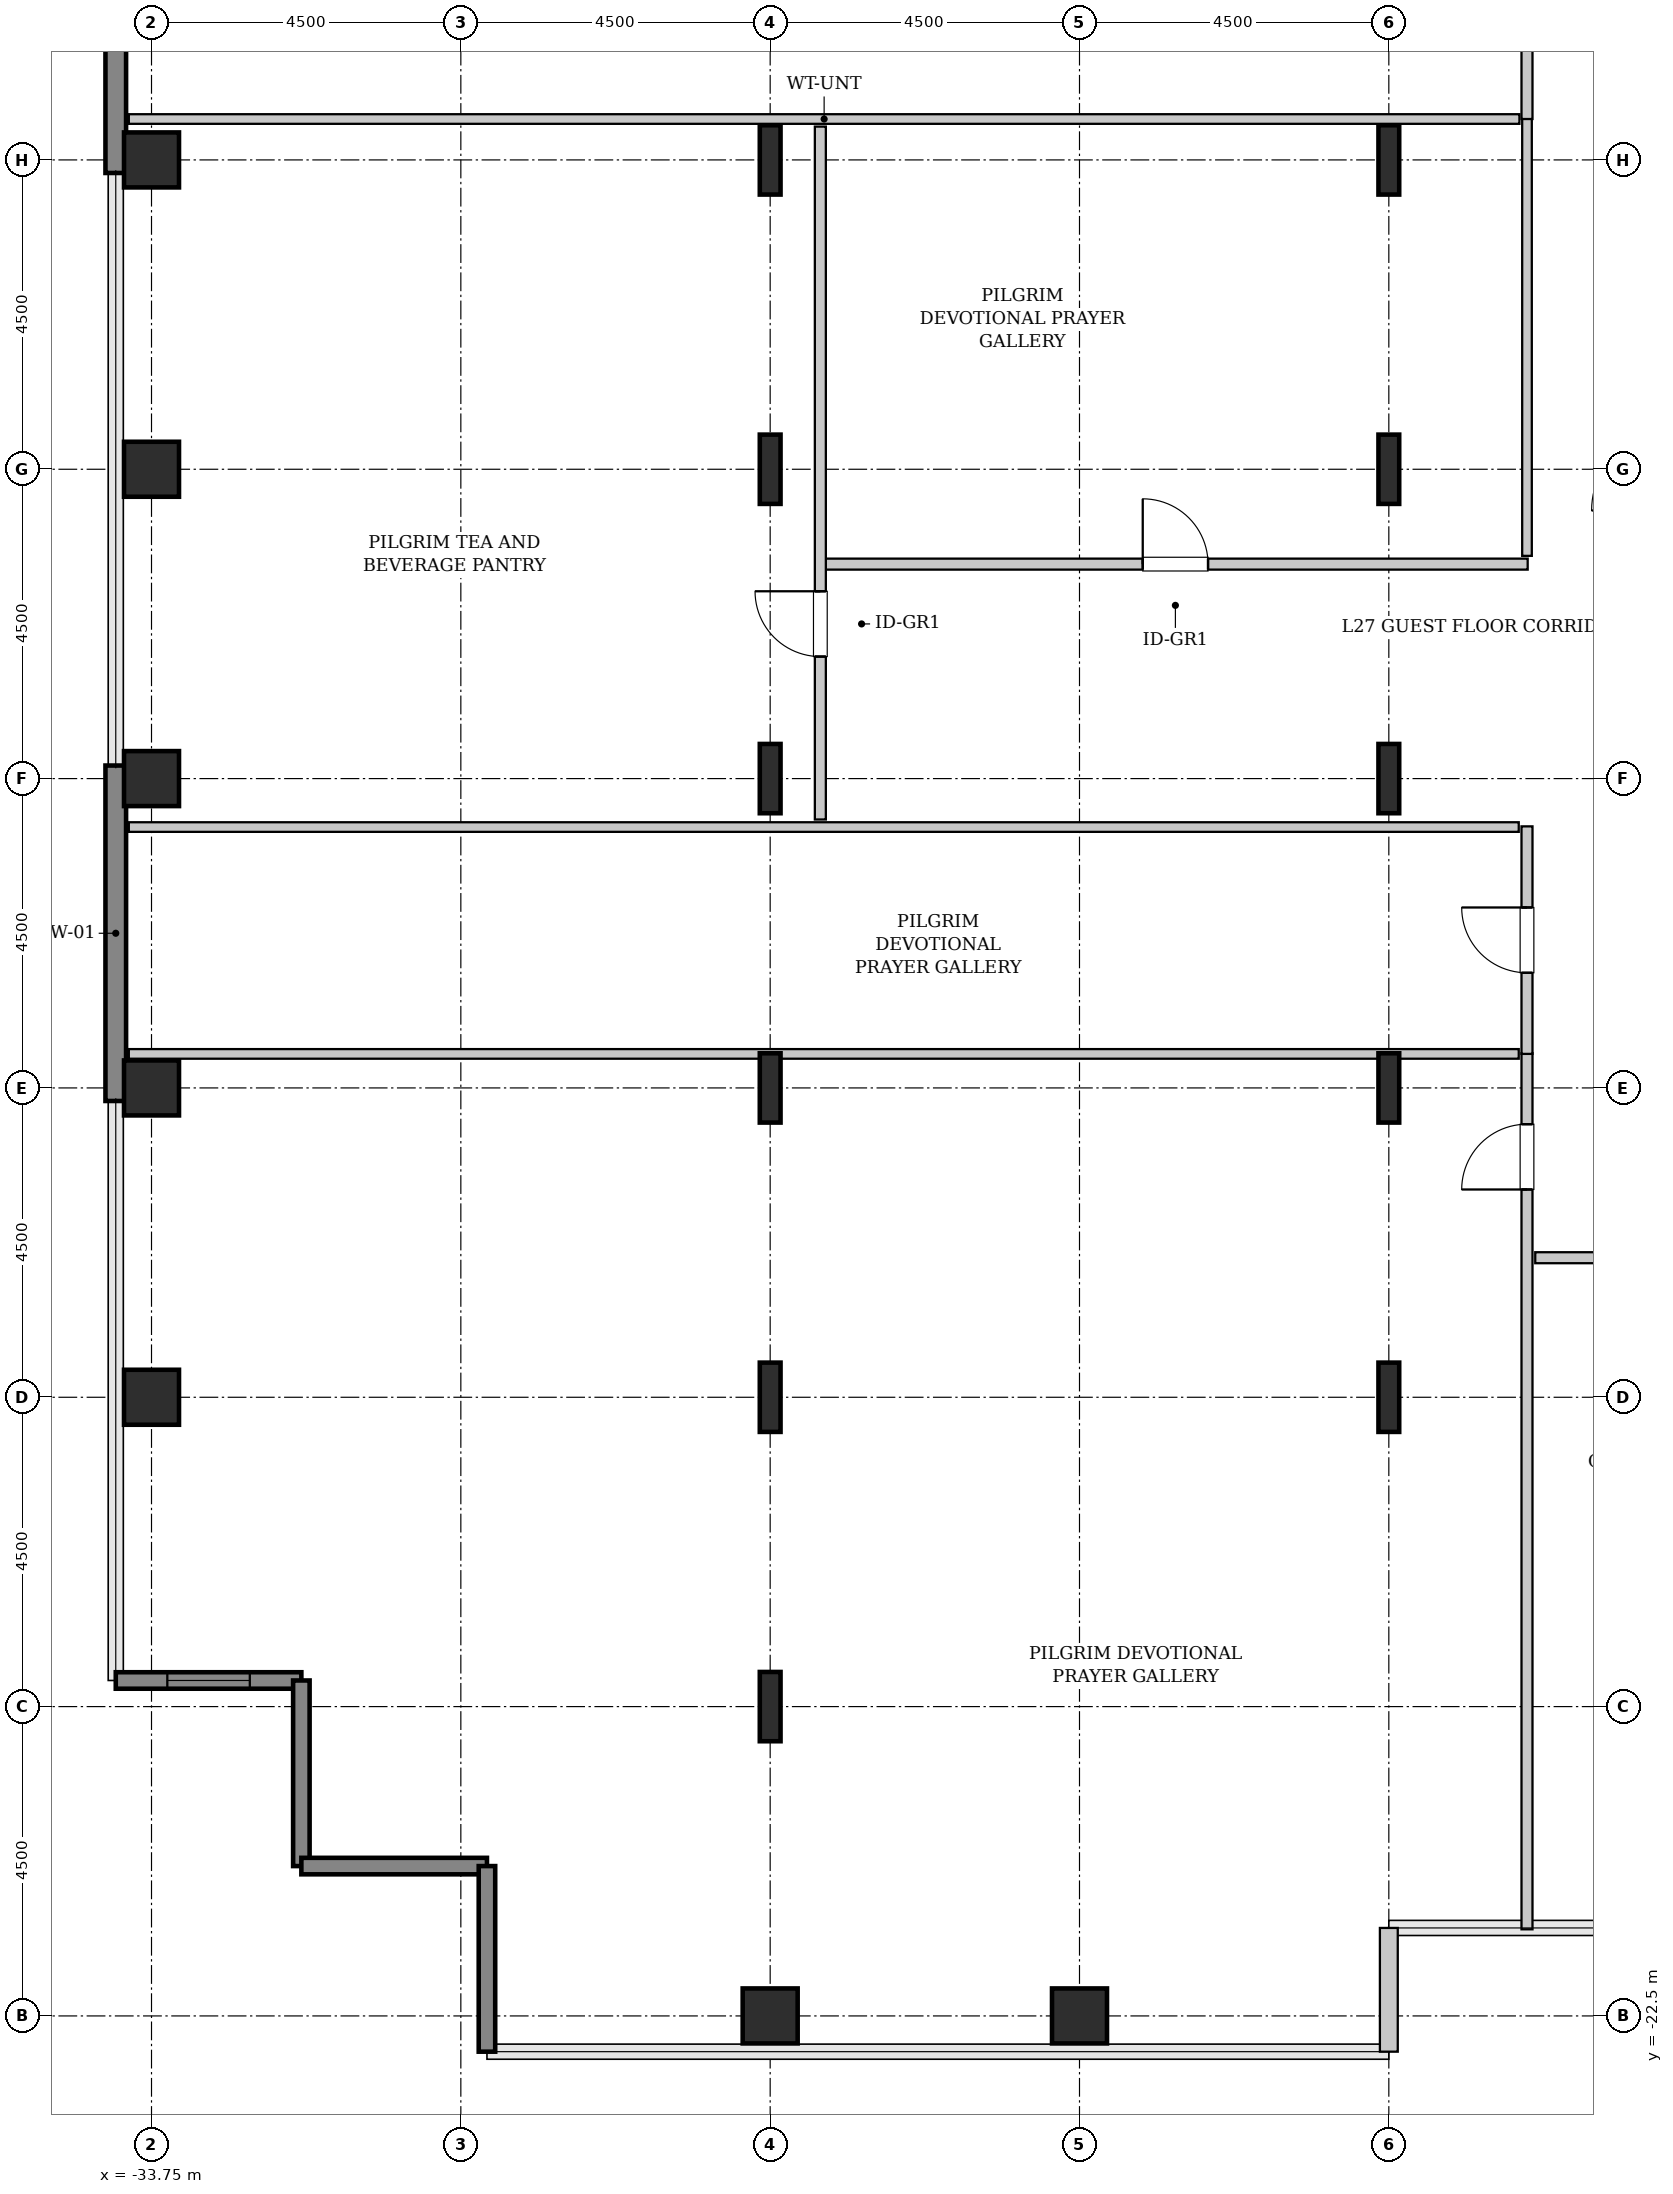
"""IFC4 building model, lengths in metres.
Left out: names, types, materials, properties, quantities, classifications, styles, units other than length and angle.
Written with IfcOpenShell. Run it as: python <this file> out.ifc"""

import sys

from ifc_helpers import new_model, si_unit, direction, frame, frame_2d, origin, origin_2d, place, context, subcontext, project, spatial, rectangle, hollow_rectangle, i_section, extrude, source, transform, mapped, element, fill, save


model = new_model("IFC4")
c1 = context("Model", 3, precision=1e-05, world=origin(), true_north=direction((0.0, 1.0)))
c2 = subcontext(c1, "Body", "Model", "MODEL_VIEW")
j1 = project(units=[si_unit("LENGTHUNIT", "METRE"), si_unit("PLANEANGLEUNIT", "RADIAN")], contexts=[c1])
p1 = place(None, origin())
s1 = spatial("IfcSite", under=j1, at=p1, CompositionType="ELEMENT")
p2 = place(p1, origin())
s2 = spatial("IfcBuilding", under=s1, at=p2, CompositionType="ELEMENT")
p3 = place(p2, frame((0.0, 0.0, 113.6)))
s3 = spatial("IfcBuildingStorey", under=s2, at=p3, CompositionType="ELEMENT", Elevation=113.6)
m1 = source(origin(), c2, "Body", "SweptSolid", [
    extrude(hollow_rectangle(XDim=0.8, YDim=0.8, WallThickness=0.04, InnerFilletRadius=0.04, OuterFilletRadius=0.08, at=origin_2d()), origin(), (0.0, 0.0, 1.0), 3.8),
])
for number, where, z_axis, x_axis in (
    (1, (-33.75, -13.5, 0.0), (0.0, 0.0, 1.0), (1.0, 0.0, 0.0)),
    (2, (-33.75, -9.0, 0.0), (0.0, 0.0, 1.0), (1.0, 0.0, 0.0)),
    (3, (-33.75, -4.5, 0.0), (0.0, 0.0, 1.0), (1.0, 0.0, 0.0)),
    (4, (-33.75, 0.0, 0.0), (0.0, 0.0, 1.0), (1.0, 0.0, 0.0)),
    (5, (-33.75, 4.5, 0.0), (0.0, 0.0, 1.0), (1.0, 0.0, 0.0)),
    (6, (-24.75, -22.5, 0.0), (0.0, 0.0, 1.0), (1.0, 0.0, 0.0)),
):
    element("IfcColumn", number, at=place(p3, frame(where, z_axis=z_axis, x_axis=x_axis)), inside=s3, PredefinedType="COLUMN", context=c2, shape_type="MappedRepresentation", body=[
        mapped(m1, transform((0.0, 0.0, 0.0), x_axis=(1.0, 0.0, 0.0), y_axis=(0.0, 1.0, 0.0), z_axis=(0.0, 0.0, 1.0), scale=1.0)),
    ])
m2 = source(origin(), c2, "Body", "SweptSolid", [
    extrude(i_section(OverallWidth=0.302, OverallDepth=1.008, WebThickness=0.021, FlangeThickness=0.04, FilletRadius=0.03, at=origin_2d()), origin(), (0.0, 0.0, 1.0), 3.8),
])
for number, where, z_axis, x_axis in (
    (7, (-24.75, -18.0, 0.0), (0.0, 0.0, 1.0), (1.0, 0.0, 0.0)),
    (8, (-24.75, -13.5, 0.0), (0.0, 0.0, 1.0), (1.0, 0.0, 0.0)),
    (9, (-24.75, -9.0, 0.0), (0.0, 0.0, 1.0), (1.0, 0.0, 0.0)),
    (10, (-24.75, -4.5, 0.0), (0.0, 0.0, 1.0), (1.0, 0.0, 0.0)),
    (11, (-24.75, 0.0, 0.0), (0.0, 0.0, 1.0), (1.0, 0.0, 0.0)),
    (12, (-24.75, 4.5, 0.0), (0.0, 0.0, 1.0), (1.0, 0.0, 0.0)),
):
    element("IfcColumn", number, at=place(p3, frame(where, z_axis=z_axis, x_axis=x_axis)), inside=s3, PredefinedType="COLUMN", context=c2, shape_type="MappedRepresentation", body=[
        mapped(m2, transform((0.0, 0.0, 0.0), x_axis=(1.0, 0.0, 0.0), y_axis=(0.0, 1.0, 0.0), z_axis=(0.0, 0.0, 1.0), scale=1.0)),
    ])
p4 = place(p3, frame((-20.25, -22.5, 0.0), z_axis=(0.0, 0.0, 1.0), x_axis=(1.0, 0.0, 0.0)))
e13 = element("IfcColumn", 13, at=p4, inside=s3, PredefinedType="COLUMN", context=c2, shape_type="MappedRepresentation", body=[
    mapped(m1, transform((0.0, 0.0, 0.0), x_axis=(1.0, 0.0, 0.0), y_axis=(0.0, 1.0, 0.0), z_axis=(0.0, 0.0, 1.0), scale=1.0)),
])
for number, where, z_axis, x_axis in (
    (14, (-15.75, -13.5, 0.0), (0.0, 0.0, 1.0), (1.0, 0.0, 0.0)),
    (15, (-15.75, -9.0, 0.0), (0.0, 0.0, 1.0), (1.0, 0.0, 0.0)),
    (16, (-15.75, -4.5, 0.0), (0.0, 0.0, 1.0), (1.0, 0.0, 0.0)),
    (17, (-15.75, 0.0, 0.0), (0.0, 0.0, 1.0), (1.0, 0.0, 0.0)),
    (18, (-15.75, 4.5, 0.0), (0.0, 0.0, 1.0), (1.0, 0.0, 0.0)),
):
    element("IfcColumn", number, at=place(p3, frame(where, z_axis=z_axis, x_axis=x_axis)), inside=s3, PredefinedType="COLUMN", context=c2, shape_type="MappedRepresentation", body=[
        mapped(m2, transform((0.0, 0.0, 0.0), x_axis=(1.0, 0.0, 0.0), y_axis=(0.0, 1.0, 0.0), z_axis=(0.0, 0.0, 1.0), scale=1.0)),
    ])
m3 = source(origin(), c2, "Body", "SweptSolid", [
    extrude(rectangle(XDim=4.88, YDim=0.3, at=frame_2d((2.44, 0.0))), origin(), (0.0, 0.0, 1.0), 3.55),
])
for number, where, z_axis, x_axis in (
    (19, (-34.27, -9.19, 0.0), (0.0, 0.0, 1.0), (0.0, 1.0, 0.0)),
    (20, (-34.27, 4.31, 0.0), (0.0, 0.0, 1.0), (0.0, 1.0, 0.0)),
):
    element("IfcWall", number, at=place(p3, frame(where, z_axis=z_axis, x_axis=x_axis)), inside=s3, PredefinedType="SHEAR", context=c2, shape_type="MappedRepresentation", body=[
        mapped(m3, transform((0.0, 0.0, 0.0), x_axis=(1.0, 0.0, 0.0), y_axis=(0.0, 1.0, 0.0), z_axis=(0.0, 0.0, 1.0), scale=1.0)),
    ])
m4 = source(origin(), c2, "Body", "SweptSolid", [
    extrude(rectangle(XDim=2.7, YDim=0.24, at=frame_2d((1.35, 0.0))), origin(), (0.0, 0.0, 1.0), 3.55),
])
p5 = place(p3, frame((-34.27, -17.62, 0.0), z_axis=(0.0, 0.0, 1.0), x_axis=(1.0, 0.0, 0.0)))
e21 = element("IfcWall", 21, at=p5, inside=s3, PredefinedType="SHEAR", context=c2, shape_type="MappedRepresentation", body=[
    mapped(m4, transform((0.0, 0.0, 0.0), x_axis=(1.0, 0.0, 0.0), y_axis=(0.0, 1.0, 0.0), z_axis=(0.0, 0.0, 1.0), scale=1.0)),
])
p6 = place(p5, frame((0.75, 0.0, 0.85)))
e22 = element("IfcOpeningElement", 22, at=p6, cuts=e21, PredefinedType="OPENING", context=c2, shape_type="SweptSolid", body=[
    extrude(rectangle(XDim=1.2, YDim=1.8, at=frame_2d((0.6, 0.9))), frame((0.0, 0.13, 0.0), z_axis=(0.0, -1.0, 0.0), x_axis=(1.0, 0.0, 0.0)), (0.0, 0.0, 1.0), 0.26),
])
for number, where, z_axis, x_axis in (
    (23, (-31.57, -17.62, 0.0), (0.0, 0.0, 1.0), (0.0, -1.0, 0.0)),
    (24, (-31.57, -20.32, 0.0), (0.0, 0.0, 1.0), (1.0, 0.0, 0.0)),
    (25, (-28.87, -20.32, 0.0), (0.0, 0.0, 1.0), (0.0, -1.0, 0.0)),
):
    element("IfcWall", number, at=place(p3, frame(where, z_axis=z_axis, x_axis=x_axis)), inside=s3, PredefinedType="SHEAR", context=c2, shape_type="MappedRepresentation", body=[
        mapped(m4, transform((0.0, 0.0, 0.0), x_axis=(1.0, 0.0, 0.0), y_axis=(0.0, 1.0, 0.0), z_axis=(0.0, 0.0, 1.0), scale=1.0)),
    ])
m5 = source(origin(), c2, "Body", "SweptSolid", [
    extrude(rectangle(XDim=1.8, YDim=0.26, at=frame_2d((0.9, 0.0))), origin(), (0.0, 0.0, 1.0), 3.55),
])
p7 = place(p3, frame((-15.75, -23.02, 0.0), z_axis=(0.0, 0.0, 1.0), x_axis=(0.0, 1.0, 0.0)))
e26 = element("IfcWall", 26, at=p7, inside=s3, PredefinedType="SOLIDWALL", context=c2, shape_type="MappedRepresentation", body=[
    mapped(m5, transform((0.0, 0.0, 0.0), x_axis=(1.0, 0.0, 0.0), y_axis=(0.0, 1.0, 0.0), z_axis=(0.0, 0.0, 1.0), scale=1.0)),
])
m6 = source(origin(), c2, "Body", "SweptSolid", [
    extrude(rectangle(XDim=12.745, YDim=0.16, at=frame_2d((6.373, 0.0))), origin(), (0.0, 0.0, 1.0), 3.535),
])
p8 = place(p3, frame((-13.74, -21.24, 0.0), z_axis=(0.0, 0.0, 1.0), x_axis=(0.0, 1.0, 0.0)))
e27 = element("IfcWall", 27, at=p8, inside=s3, PredefinedType="PARTITIONING", context=c2, shape_type="MappedRepresentation", body=[
    mapped(m6, transform((0.0, 0.0, 0.0), x_axis=(1.0, 0.0, 0.0), y_axis=(0.0, 1.0, 0.0), z_axis=(0.0, 0.0, 1.0), scale=1.0)),
])
p9 = place(p8, frame((10.762, 0.0, 0.0)))
e28 = element("IfcOpeningElement", 28, at=p9, cuts=e27, PredefinedType="OPENING", context=c2, shape_type="SweptSolid", body=[
    extrude(rectangle(XDim=0.95, YDim=2.1, at=frame_2d((0.475, 1.05))), frame((0.0, 0.09, 0.0), z_axis=(0.0, -1.0, 0.0), x_axis=(1.0, 0.0, 0.0)), (0.0, 0.0, 1.0), 0.18),
])
m7 = source(origin(), c2, "Body", "SweptSolid", [
    extrude(rectangle(XDim=20.22, YDim=0.14, at=frame_2d((10.11, 0.0))), origin(), (0.0, 0.0, 1.0), 2.875),
])
p10 = place(p3, frame((-34.08, -8.505, 0.0), z_axis=(0.0, 0.0, 1.0), x_axis=(1.0, 0.0, 0.0)))
e29 = element("IfcWall", 29, at=p10, inside=s3, PredefinedType="PARTITIONING", context=c2, shape_type="MappedRepresentation", body=[
    mapped(m7, transform((0.0, 0.0, 0.0), x_axis=(1.0, 0.0, 0.0), y_axis=(0.0, 1.0, 0.0), z_axis=(0.0, 0.0, 1.0), scale=1.0)),
])
m8 = source(origin(), c2, "Body", "SweptSolid", [
    extrude(rectangle(XDim=3.31, YDim=0.16, at=frame_2d((1.655, 0.0))), origin(), (0.0, 0.0, 1.0), 3.535),
])
p11 = place(p3, frame((-13.74, -8.505, 0.0), z_axis=(0.0, 0.0, 1.0), x_axis=(0.0, 1.0, 0.0)))
e30 = element("IfcWall", 30, at=p11, inside=s3, PredefinedType="PARTITIONING", context=c2, shape_type="MappedRepresentation", body=[
    mapped(m8, transform((0.0, 0.0, 0.0), x_axis=(1.0, 0.0, 0.0), y_axis=(0.0, 1.0, 0.0), z_axis=(0.0, 0.0, 1.0), scale=1.0)),
])
p12 = place(p11, frame((1.18, 0.0, 0.0)))
e31 = element("IfcOpeningElement", 31, at=p12, cuts=e30, PredefinedType="OPENING", context=c2, shape_type="SweptSolid", body=[
    extrude(rectangle(XDim=0.95, YDim=2.1, at=frame_2d((0.475, 1.05))), frame((0.0, 0.09, 0.0), z_axis=(0.0, -1.0, 0.0), x_axis=(1.0, 0.0, 0.0)), (0.0, 0.0, 1.0), 0.18),
])
m9 = source(origin(), c2, "Body", "SweptSolid", [
    extrude(rectangle(XDim=20.22, YDim=0.14, at=frame_2d((10.11, 0.0))), origin(), (0.0, 0.0, 1.0), 3.535),
])
p13 = place(p3, frame((-34.08, -5.205, 0.0), z_axis=(0.0, 0.0, 1.0), x_axis=(1.0, 0.0, 0.0)))
e32 = element("IfcWall", 32, at=p13, inside=s3, PredefinedType="PARTITIONING", context=c2, shape_type="MappedRepresentation", body=[
    mapped(m9, transform((0.0, 0.0, 0.0), x_axis=(1.0, 0.0, 0.0), y_axis=(0.0, 1.0, 0.0), z_axis=(0.0, 0.0, 1.0), scale=1.0)),
])
m10 = source(origin(), c2, "Body", "SweptSolid", [
    extrude(rectangle(XDim=10.25, YDim=0.16, at=frame_2d((5.125, 0.0))), origin(), (0.0, 0.0, 1.0), 3.535),
])
p14 = place(p3, frame((-23.98, -1.38, 0.0), z_axis=(0.0, 0.0, 1.0), x_axis=(1.0, 0.0, 0.0)))
e33 = element("IfcWall", 33, at=p14, inside=s3, PredefinedType="PARTITIONING", context=c2, shape_type="MappedRepresentation", body=[
    mapped(m10, transform((0.0, 0.0, 0.0), x_axis=(1.0, 0.0, 0.0), y_axis=(0.0, 1.0, 0.0), z_axis=(0.0, 0.0, 1.0), scale=1.0)),
])
p15 = place(p14, frame((4.65, 0.0, 0.0)))
e34 = element("IfcOpeningElement", 34, at=p15, cuts=e33, PredefinedType="OPENING", context=c2, shape_type="SweptSolid", body=[
    extrude(rectangle(XDim=0.95, YDim=2.1, at=frame_2d((0.475, 1.05))), frame((0.0, 0.09, 0.0), z_axis=(0.0, -1.0, 0.0), x_axis=(1.0, 0.0, 0.0)), (0.0, 0.0, 1.0), 0.18),
])
m11 = source(origin(), c2, "Body", "SweptSolid", [
    extrude(rectangle(XDim=6.365, YDim=0.14, at=frame_2d((3.183, 0.0))), origin(), (0.0, 0.0, 1.0), 3.535),
])
p16 = place(p3, frame((-13.74, -1.26, 0.0), z_axis=(0.0, 0.0, 1.0), x_axis=(0.0, 1.0, 0.0)))
e35 = element("IfcWall", 35, at=p16, inside=s3, PredefinedType="PARTITIONING", context=c2, shape_type="MappedRepresentation", body=[
    mapped(m11, transform((0.0, 0.0, 0.0), x_axis=(1.0, 0.0, 0.0), y_axis=(0.0, 1.0, 0.0), z_axis=(0.0, 0.0, 1.0), scale=1.0)),
])
m12 = source(origin(), c2, "Body", "SweptSolid", [
    extrude(rectangle(XDim=20.23, YDim=0.14, at=frame_2d((10.115, 0.0))), origin(), (0.0, 0.0, 1.0), 3.535),
])
p17 = place(p3, frame((-34.08, 5.095, 0.0), z_axis=(0.0, 0.0, 1.0), x_axis=(1.0, 0.0, 0.0)))
e36 = element("IfcWall", 36, at=p17, inside=s3, PredefinedType="PARTITIONING", context=c2, shape_type="MappedRepresentation", body=[
    mapped(m12, transform((0.0, 0.0, 0.0), x_axis=(1.0, 0.0, 0.0), y_axis=(0.0, 1.0, 0.0), z_axis=(0.0, 0.0, 1.0), scale=1.0)),
])
m13 = source(origin(), c2, "Body", "SweptSolid", [
    extrude(rectangle(XDim=10.08, YDim=0.16, at=frame_2d((5.04, 0.0))), origin(), (0.0, 0.0, 1.0), 3.535),
])
p18 = place(p3, frame((-24.02, -5.095, 0.0), z_axis=(0.0, 0.0, 1.0), x_axis=(0.0, 1.0, 0.0)))
e37 = element("IfcWall", 37, at=p18, inside=s3, PredefinedType="PARTITIONING", context=c2, shape_type="MappedRepresentation", body=[
    mapped(m13, transform((0.0, 0.0, 0.0), x_axis=(1.0, 0.0, 0.0), y_axis=(0.0, 1.0, 0.0), z_axis=(0.0, 0.0, 1.0), scale=1.0)),
])
p19 = place(p18, frame((2.37, 0.0, 0.0)))
e38 = element("IfcOpeningElement", 38, at=p19, cuts=e37, PredefinedType="OPENING", context=c2, shape_type="SweptSolid", body=[
    extrude(rectangle(XDim=0.95, YDim=2.1, at=frame_2d((0.475, 1.05))), frame((0.0, 0.09, 0.0), z_axis=(0.0, -1.0, 0.0), x_axis=(1.0, 0.0, 0.0)), (0.0, 0.0, 1.0), 0.18),
])
m14 = source(origin(), c2, "Body", "SweptSolid", [
    extrude(rectangle(XDim=3.41, YDim=0.16, at=frame_2d((1.705, 0.0))), origin(), (0.0, 0.0, 1.0), 3.535),
])
p20 = place(p3, frame((-13.74, 5.095, 0.0), z_axis=(0.0, 0.0, 1.0), x_axis=(0.0, 1.0, 0.0)))
e39 = element("IfcWall", 39, at=p20, inside=s3, PredefinedType="PARTITIONING", context=c2, shape_type="MappedRepresentation", body=[
    mapped(m14, transform((0.0, 0.0, 0.0), x_axis=(1.0, 0.0, 0.0), y_axis=(0.0, 1.0, 0.0), z_axis=(0.0, 0.0, 1.0), scale=1.0)),
])
p21 = place(p20, frame((1.23, 0.0, 0.0)))
e40 = element("IfcOpeningElement", 40, at=p21, cuts=e39, PredefinedType="OPENING", context=c2, shape_type="SweptSolid", body=[
    extrude(rectangle(XDim=0.95, YDim=2.1, at=frame_2d((0.475, 1.05))), frame((0.0, 0.09, 0.0), z_axis=(0.0, -1.0, 0.0), x_axis=(1.0, 0.0, 0.0)), (0.0, 0.0, 1.0), 0.18),
])
m15 = source(origin(), c2, "Body", "SweptSolid", [
    extrude(rectangle(XDim=4.025, YDim=0.16, at=frame_2d((2.013, 0.0))), origin(), (0.0, 0.0, 1.0), 3.535),
])
p22 = place(p3, frame((-13.62, -11.47, 0.0), z_axis=(0.0, 0.0, 1.0), x_axis=(1.0, 0.0, 0.0)))
e41 = element("IfcWall", 41, at=p22, inside=s3, PredefinedType="PARTITIONING", context=c2, shape_type="MappedRepresentation", body=[
    mapped(m15, transform((0.0, 0.0, 0.0), x_axis=(1.0, 0.0, 0.0), y_axis=(0.0, 1.0, 0.0), z_axis=(0.0, 0.0, 1.0), scale=1.0)),
])
p23 = place(p22, frame((1.538, 0.0, 0.0)))
e42 = element("IfcOpeningElement", 42, at=p23, cuts=e41, PredefinedType="OPENING", context=c2, shape_type="SweptSolid", body=[
    extrude(rectangle(XDim=0.95, YDim=2.1, at=frame_2d((0.475, 1.05))), frame((0.0, 0.09, 0.0), z_axis=(0.0, -1.0, 0.0), x_axis=(1.0, 0.0, 0.0)), (0.0, 0.0, 1.0), 0.18),
])
m16 = source(origin(), c2, "Body", "SweptSolid", [
    extrude(rectangle(XDim=1.2, YDim=1.8, at=frame_2d((0.6, 0.9))), frame((0.0, 0.03, 0.0), z_axis=(0.0, -1.0, 0.0), x_axis=(1.0, 0.0, 0.0)), (0.0, 0.0, 1.0), 0.06),
])
p24 = place(p6, origin())
e43 = element("IfcWindow", 43, at=p24, inside=s3, PartitioningType="SINGLE_PANEL", PredefinedType="WINDOW", context=c2, shape_type="MappedRepresentation", body=[
    mapped(m16, transform((0.0, 0.0, 0.0), x_axis=(1.0, 0.0, 0.0), y_axis=(0.0, 1.0, 0.0), z_axis=(0.0, 0.0, 1.0), scale=1.0)),
])
fill(e22, e43)
m17 = source(origin(), c2, "Body", "SweptSolid", [
    extrude(rectangle(XDim=0.95, YDim=2.1, at=frame_2d((0.475, 1.05))), frame((0.0, 0.025, 0.0), z_axis=(0.0, -1.0, 0.0), x_axis=(1.0, 0.0, 0.0)), (0.0, 0.0, 1.0), 0.05),
])
p25 = place(p9, origin())
e44 = element("IfcDoor", 44, at=p25, inside=s3, OperationType="SINGLE_SWING_LEFT", PredefinedType="DOOR", context=c2, shape_type="MappedRepresentation", body=[
    mapped(m17, transform((0.0, 0.0, 0.0), x_axis=(1.0, 0.0, 0.0), y_axis=(0.0, 1.0, 0.0), z_axis=(0.0, 0.0, 1.0), scale=1.0)),
])
fill(e28, e44)
p26 = place(p12, origin())
e45 = element("IfcDoor", 45, at=p26, inside=s3, OperationType="SINGLE_SWING_RIGHT", PredefinedType="DOOR", context=c2, shape_type="MappedRepresentation", body=[
    mapped(m17, transform((0.0, 0.0, 0.0), x_axis=(1.0, 0.0, 0.0), y_axis=(0.0, 1.0, 0.0), z_axis=(0.0, 0.0, 1.0), scale=1.0)),
])
fill(e31, e45)
p27 = place(p15, origin())
e46 = element("IfcDoor", 46, at=p27, inside=s3, OperationType="SINGLE_SWING_LEFT", PredefinedType="DOOR", context=c2, shape_type="MappedRepresentation", body=[
    mapped(m17, transform((0.0, 0.0, 0.0), x_axis=(1.0, 0.0, 0.0), y_axis=(0.0, 1.0, 0.0), z_axis=(0.0, 0.0, 1.0), scale=1.0)),
])
fill(e34, e46)
p28 = place(p19, origin())
e47 = element("IfcDoor", 47, at=p28, inside=s3, OperationType="SINGLE_SWING_RIGHT", PredefinedType="DOOR", context=c2, shape_type="MappedRepresentation", body=[
    mapped(m17, transform((0.0, 0.0, 0.0), x_axis=(1.0, 0.0, 0.0), y_axis=(0.0, 1.0, 0.0), z_axis=(0.0, 0.0, 1.0), scale=1.0)),
])
fill(e38, e47)
save(model, sys.argv[1])
